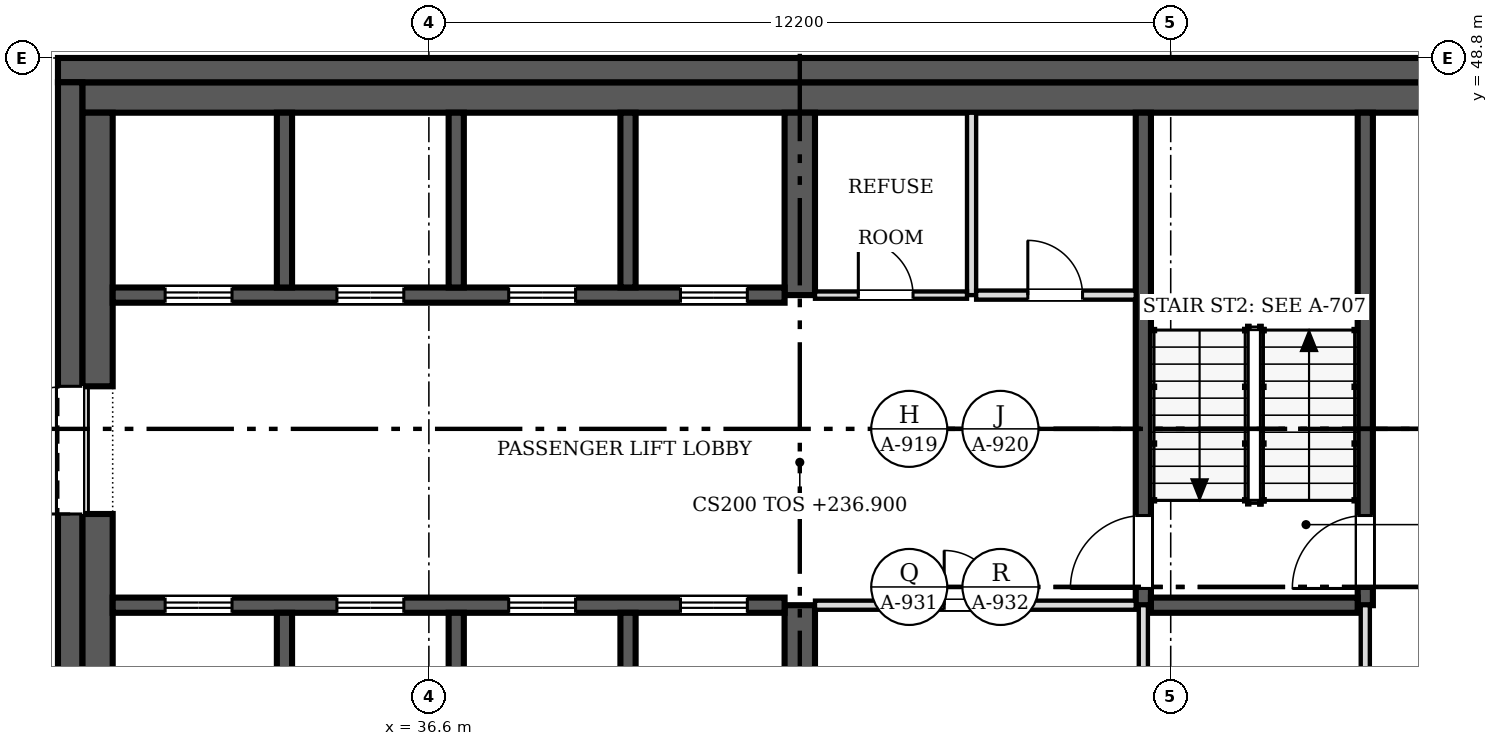
"""IFC4 building model, lengths in metres.
Left out: names, types, materials, properties, quantities, classifications, styles, units other than length and angle.
Written with IfcOpenShell. Run it as: python <this file> out.ifc"""

import sys

from ifc_helpers import new_model, si_unit, direction, frame, frame_2d, origin, place, context, subcontext, project, spatial, rectangle, extrude, source, transform, mapped, element, fill, save


model = new_model("IFC4")
c1 = context("Model", 3, precision=1e-05, world=origin(), true_north=direction((0.0, 1.0)))
c2 = subcontext(c1, "Body", "Model", "MODEL_VIEW")
j1 = project(units=[si_unit("LENGTHUNIT", "METRE"), si_unit("PLANEANGLEUNIT", "RADIAN")], contexts=[c1])
p1 = place(None, origin())
s1 = spatial("IfcSite", under=j1, at=p1, CompositionType="ELEMENT")
p2 = place(p1, origin())
s2 = spatial("IfcBuilding", under=s1, at=p2, CompositionType="ELEMENT")
p3 = place(p2, frame((0.0, 0.0, 236.9)))
s3 = spatial("IfcBuildingStorey", under=s2, at=p3, CompositionType="ELEMENT", Elevation=236.9)
p4 = place(p3, frame((30.7, 24.8, 0.0), z_axis=(0.0, 0.0, 1.0), x_axis=(0.0, 1.0, 0.0)))
e1 = element("IfcWall", 1, at=p4, inside=s3, PredefinedType="SHEAR", context=c2, shape_type="SweptSolid", body=[
    extrude(rectangle(XDim=23.6, YDim=0.4, at=frame_2d((11.8, 0.0))), origin(), (0.0, 0.0, 1.0), 3.8),
])
m1 = source(origin(), c2, "Body", "SweptSolid", [
    extrude(rectangle(XDim=2.1, YDim=2.4, at=frame_2d((1.05, 1.2))), frame((0.0, 0.21, 0.0), z_axis=(0.0, -1.0, 0.0), x_axis=(1.0, 0.0, 0.0)), (0.0, 0.0, 1.0), 0.42),
])
p5 = place(p4, frame((5.0, 0.0, 0.0)))
e2 = element("IfcOpeningElement", 2, at=p5, cuts=e1, PredefinedType="OPENING", context=c2, shape_type="MappedRepresentation", body=[
    mapped(m1, transform((0.0, 0.0, 0.0), scale=1.0)),
])
p6 = place(p4, frame((16.5, 0.0, 0.0)))
e3 = element("IfcOpeningElement", 3, at=p6, cuts=e1, PredefinedType="OPENING", context=c2, shape_type="MappedRepresentation", body=[
    mapped(m1, transform((0.0, 0.0, 0.0), scale=1.0)),
])
p7 = place(p3, frame((30.5, 48.6, 0.0), z_axis=(0.0, 0.0, 1.0), x_axis=(1.0, 0.0, 0.0)))
e4 = element("IfcWall", 4, at=p7, inside=s3, PredefinedType="SHEAR", context=c2, shape_type="SweptSolid", body=[
    extrude(rectangle(XDim=24.4, YDim=0.4, at=frame_2d((12.2, 0.0))), origin(), (0.0, 0.0, 1.0), 3.8),
])
p8 = place(p3, frame((30.9, 48.15, 0.0), z_axis=(0.0, 0.0, 1.0), x_axis=(1.0, 0.0, 0.0)))
e5 = element("IfcWall", 5, at=p8, inside=s3, PredefinedType="SOLIDWALL", context=c2, shape_type="SweptSolid", body=[
    extrude(rectangle(XDim=23.6, YDim=0.5, at=frame_2d((11.8, 0.0))), origin(), (0.0, 0.0, 1.0), 3.8),
])
p9 = place(p3, frame((31.15, 31.9, 0.0), z_axis=(0.0, 0.0, 1.0), x_axis=(0.0, 1.0, 0.0)))
e6 = element("IfcWall", 6, at=p9, inside=s3, PredefinedType="SOLIDWALL", context=c2, shape_type="SweptSolid", body=[
    extrude(rectangle(XDim=9.4, YDim=0.5, at=frame_2d((4.7, 0.0))), origin(), (0.0, 0.0, 1.0), 3.8),
])
p10 = place(p3, frame((31.15, 43.4, 0.0), z_axis=(0.0, 0.0, 1.0), x_axis=(0.0, 1.0, 0.0)))
e7 = element("IfcWall", 7, at=p10, inside=s3, PredefinedType="SOLIDWALL", context=c2, shape_type="SweptSolid", body=[
    extrude(rectangle(XDim=4.5, YDim=0.5, at=frame_2d((2.25, 0.0))), origin(), (0.0, 0.0, 1.0), 3.8),
])
p11 = place(p3, frame((42.7, 36.85, 0.0), z_axis=(0.0, 0.0, 1.0), x_axis=(0.0, 1.0, 0.0)))
e8 = element("IfcWall", 8, at=p11, inside=s3, PredefinedType="SHEAR", context=c2, shape_type="SweptSolid", body=[
    extrude(rectangle(XDim=2.95, YDim=0.5, at=frame_2d((1.475, 0.0))), origin(), (0.0, 0.0, 1.0), 3.8),
])
p12 = place(p3, frame((42.7, 44.9, 0.0), z_axis=(0.0, 0.0, 1.0), x_axis=(0.0, 1.0, 0.0)))
e9 = element("IfcWall", 9, at=p12, inside=s3, PredefinedType="SHEAR", context=c2, shape_type="SweptSolid", body=[
    extrude(rectangle(XDim=3.0, YDim=0.5, at=frame_2d((1.5, 0.0))), origin(), (0.0, 0.0, 1.0), 3.8),
])
p13 = place(p3, frame((31.4, 39.8, 0.0), z_axis=(0.0, 0.0, 1.0), x_axis=(1.0, 0.0, 0.0)))
e10 = element("IfcWall", 10, at=p13, inside=s3, PredefinedType="SOLIDWALL", context=c2, shape_type="SweptSolid", body=[
    extrude(rectangle(XDim=11.05, YDim=0.25, at=frame_2d((5.525, 0.0))), origin(), (0.0, 0.0, 1.0), 3.8),
])
m2 = source(origin(), c2, "Body", "SweptSolid", [
    extrude(rectangle(XDim=1.1, YDim=2.1, at=frame_2d((0.55, 1.05))), frame((0.0, 0.135, 0.0), z_axis=(0.0, -1.0, 0.0), x_axis=(1.0, 0.0, 0.0)), (0.0, 0.0, 1.0), 0.27),
])
p14 = place(p13, frame((0.863, 0.0, 0.0)))
e11 = element("IfcOpeningElement", 11, at=p14, cuts=e10, PredefinedType="OPENING", context=c2, shape_type="MappedRepresentation", body=[
    mapped(m2, transform((0.0, 0.0, 0.0), scale=1.0)),
])
p15 = place(p13, frame((3.688, 0.0, 0.0)))
e12 = element("IfcOpeningElement", 12, at=p15, cuts=e10, PredefinedType="OPENING", context=c2, shape_type="MappedRepresentation", body=[
    mapped(m2, transform((0.0, 0.0, 0.0), scale=1.0)),
])
p16 = place(p13, frame((6.512, 0.0, 0.0)))
e13 = element("IfcOpeningElement", 13, at=p16, cuts=e10, PredefinedType="OPENING", context=c2, shape_type="MappedRepresentation", body=[
    mapped(m2, transform((0.0, 0.0, 0.0), scale=1.0)),
])
p17 = place(p13, frame((9.337, 0.0, 0.0)))
e14 = element("IfcOpeningElement", 14, at=p17, cuts=e10, PredefinedType="OPENING", context=c2, shape_type="MappedRepresentation", body=[
    mapped(m2, transform((0.0, 0.0, 0.0), scale=1.0)),
])
p18 = place(p3, frame((42.45, 44.9, 0.0), z_axis=(0.0, 0.0, 1.0), x_axis=(-1.0, 0.0, 0.0)))
e15 = element("IfcWall", 15, at=p18, inside=s3, PredefinedType="SOLIDWALL", context=c2, shape_type="SweptSolid", body=[
    extrude(rectangle(XDim=11.05, YDim=0.25, at=frame_2d((5.525, 0.0))), origin(), (0.0, 0.0, 1.0), 3.8),
])
p19 = place(p18, frame((9.087, 0.0, 0.0)))
e16 = element("IfcOpeningElement", 16, at=p19, cuts=e15, PredefinedType="OPENING", context=c2, shape_type="MappedRepresentation", body=[
    mapped(m2, transform((0.0, 0.0, 0.0), scale=1.0)),
])
p20 = place(p18, frame((6.262, 0.0, 0.0)))
e17 = element("IfcOpeningElement", 17, at=p20, cuts=e15, PredefinedType="OPENING", context=c2, shape_type="MappedRepresentation", body=[
    mapped(m2, transform((0.0, 0.0, 0.0), scale=1.0)),
])
p21 = place(p18, frame((3.438, 0.0, 0.0)))
e18 = element("IfcOpeningElement", 18, at=p21, cuts=e15, PredefinedType="OPENING", context=c2, shape_type="MappedRepresentation", body=[
    mapped(m2, transform((0.0, 0.0, 0.0), scale=1.0)),
])
p22 = place(p18, frame((0.613, 0.0, 0.0)))
e19 = element("IfcOpeningElement", 19, at=p22, cuts=e15, PredefinedType="OPENING", context=c2, shape_type="MappedRepresentation", body=[
    mapped(m2, transform((0.0, 0.0, 0.0), scale=1.0)),
])
p23 = place(p3, frame((48.35, 47.9, 0.0), z_axis=(0.0, 0.0, 1.0), x_axis=(0.0, -1.0, 0.0)))
e20 = element("IfcWall", 20, at=p23, inside=s3, PredefinedType="SOLIDWALL", context=c2, shape_type="SweptSolid", body=[
    extrude(rectangle(XDim=8.1, YDim=0.25, at=frame_2d((4.05, 0.0))), origin(), (0.0, 0.0, 1.0), 3.8),
])
m3 = source(origin(), c2, "Body", "SweptSolid", [
    extrude(rectangle(XDim=1.2, YDim=2.1, at=frame_2d((0.6, 1.05))), frame((0.0, 0.135, 0.0), z_axis=(0.0, -1.0, 0.0), x_axis=(1.0, 0.0, 0.0)), (0.0, 0.0, 1.0), 0.27),
])
p24 = place(p23, frame((6.625, 0.0, 0.0)))
e21 = element("IfcOpeningElement", 21, at=p24, cuts=e20, PredefinedType="OPENING", context=c2, shape_type="MappedRepresentation", body=[
    mapped(m3, transform((0.0, 0.0, 0.0), scale=1.0)),
])
p25 = place(p3, frame((52.0, 39.8, 0.0), z_axis=(0.0, 0.0, 1.0), x_axis=(0.0, 1.0, 0.0)))
e22 = element("IfcWall", 22, at=p25, inside=s3, PredefinedType="SOLIDWALL", context=c2, shape_type="SweptSolid", body=[
    extrude(rectangle(XDim=8.1, YDim=0.25, at=frame_2d((4.05, 0.0))), origin(), (0.0, 0.0, 1.0), 3.8),
])
p26 = place(p25, frame((0.275, 0.0, 0.0)))
e23 = element("IfcOpeningElement", 23, at=p26, cuts=e22, PredefinedType="OPENING", context=c2, shape_type="MappedRepresentation", body=[
    mapped(m3, transform((0.0, 0.0, 0.0), scale=1.0)),
])
p27 = place(p3, frame((48.475, 39.8, 0.0), z_axis=(0.0, 0.0, 1.0), x_axis=(1.0, 0.0, 0.0)))
e24 = element("IfcWall", 24, at=p27, inside=s3, PredefinedType="SOLIDWALL", context=c2, shape_type="SweptSolid", body=[
    extrude(rectangle(XDim=3.4, YDim=0.25, at=frame_2d((1.7, 0.0))), origin(), (0.0, 0.0, 1.0), 3.8),
])
for number, where, z_axis, x_axis in (
    (25, (34.225, 36.85, 0.0), (0.0, 0.0, 1.0), (0.0, 1.0, 0.0)),
    (26, (37.05, 36.85, 0.0), (0.0, 0.0, 1.0), (0.0, 1.0, 0.0)),
    (27, (39.875, 36.85, 0.0), (0.0, 0.0, 1.0), (0.0, 1.0, 0.0)),
):
    element("IfcWall", number, at=place(p3, frame(where, z_axis=z_axis, x_axis=x_axis)), inside=s3, PredefinedType="SOLIDWALL", context=c2, shape_type="SweptSolid", body=[
        extrude(rectangle(XDim=2.825, YDim=0.25, at=frame_2d((1.413, 0.0))), origin(), (0.0, 0.0, 1.0), 3.8),
    ])
for number, where, z_axis, x_axis in (
    (28, (34.225, 45.025, 0.0), (0.0, 0.0, 1.0), (0.0, 1.0, 0.0)),
    (29, (37.05, 45.025, 0.0), (0.0, 0.0, 1.0), (0.0, 1.0, 0.0)),
    (30, (39.875, 45.025, 0.0), (0.0, 0.0, 1.0), (0.0, 1.0, 0.0)),
):
    element("IfcWall", number, at=place(p3, frame(where, z_axis=z_axis, x_axis=x_axis)), inside=s3, PredefinedType="SOLIDWALL", context=c2, shape_type="SweptSolid", body=[
        extrude(rectangle(XDim=2.875, YDim=0.25, at=frame_2d((1.438, 0.0))), origin(), (0.0, 0.0, 1.0), 3.8),
    ])
p28 = place(p3, frame((52.0, 33.525, 0.0), z_axis=(0.0, 0.0, 1.0), x_axis=(0.0, 1.0, 0.0)))
e31 = element("IfcWall", 31, at=p28, inside=s3, PredefinedType="PARTITIONING", context=c2, shape_type="SweptSolid", body=[
    extrude(rectangle(XDim=6.275, YDim=0.15, at=frame_2d((3.138, 0.0))), origin(), (0.0, 0.0, 1.0), 3.6),
])
m4 = source(origin(), c2, "Body", "SweptSolid", [
    extrude(rectangle(XDim=0.9, YDim=2.1, at=frame_2d((0.45, 1.05))), frame((0.0, 0.085, 0.0), z_axis=(0.0, -1.0, 0.0), x_axis=(1.0, 0.0, 0.0)), (0.0, 0.0, 1.0), 0.17),
])
p29 = place(p28, frame((1.025, 0.0, 0.0)))
e32 = element("IfcOpeningElement", 32, at=p29, cuts=e31, PredefinedType="OPENING", context=c2, shape_type="MappedRepresentation", body=[
    mapped(m4, transform((0.0, 0.0, 0.0), scale=1.0)),
])
p30 = place(p3, frame((48.225, 39.8, 0.0), z_axis=(0.0, 0.0, 1.0), x_axis=(-1.0, 0.0, 0.0)))
e33 = element("IfcWall", 33, at=p30, inside=s3, PredefinedType="PARTITIONING", context=c2, shape_type="SweptSolid", body=[
    extrude(rectangle(XDim=5.275, YDim=0.15, at=frame_2d((2.638, 0.0))), origin(), (0.0, 0.0, 1.0), 3.6),
])
p31 = place(p30, frame((2.25, 0.0, 0.0)))
e34 = element("IfcOpeningElement", 34, at=p31, cuts=e33, PredefinedType="OPENING", context=c2, shape_type="MappedRepresentation", body=[
    mapped(m4, transform((0.0, 0.0, 0.0), scale=1.0)),
])
p32 = place(p3, frame((48.35, 36.85, 0.0), z_axis=(0.0, 0.0, 1.0), x_axis=(0.0, 1.0, 0.0)))
e35 = element("IfcWall", 35, at=p32, inside=s3, PredefinedType="PARTITIONING", context=c2, shape_type="SweptSolid", body=[
    extrude(rectangle(XDim=2.95, YDim=0.15, at=frame_2d((1.475, 0.0))), origin(), (0.0, 0.0, 1.0), 3.6),
])
p33 = place(p3, frame((45.525, 44.9, 0.0), z_axis=(0.0, 0.0, 1.0), x_axis=(0.0, 1.0, 0.0)))
e36 = element("IfcWall", 36, at=p33, inside=s3, PredefinedType="PARTITIONING", context=c2, shape_type="SweptSolid", body=[
    extrude(rectangle(XDim=3.0, YDim=0.15, at=frame_2d((1.5, 0.0))), origin(), (0.0, 0.0, 1.0), 3.6),
])
p34 = place(p3, frame((42.95, 44.9, 0.0), z_axis=(0.0, 0.0, 1.0), x_axis=(1.0, 0.0, 0.0)))
e37 = element("IfcWall", 37, at=p34, inside=s3, PredefinedType="PARTITIONING", context=c2, shape_type="SweptSolid", body=[
    extrude(rectangle(XDim=2.5, YDim=0.12, at=frame_2d((1.25, 0.0))), origin(), (0.0, 0.0, 1.0), 3.6),
])
m5 = source(origin(), c2, "Body", "SweptSolid", [
    extrude(rectangle(XDim=0.9, YDim=2.1, at=frame_2d((0.45, 1.05))), frame((0.0, 0.07, 0.0), z_axis=(0.0, -1.0, 0.0), x_axis=(1.0, 0.0, 0.0)), (0.0, 0.0, 1.0), 0.14),
])
p35 = place(p34, frame((0.712, 0.0, 0.0)))
e38 = element("IfcOpeningElement", 38, at=p35, cuts=e37, PredefinedType="OPENING", context=c2, shape_type="MappedRepresentation", body=[
    mapped(m5, transform((0.0, 0.0, 0.0), scale=1.0)),
])
p36 = place(p3, frame((45.6, 44.9, 0.0), z_axis=(0.0, 0.0, 1.0), x_axis=(1.0, 0.0, 0.0)))
e39 = element("IfcWall", 39, at=p36, inside=s3, PredefinedType="PARTITIONING", context=c2, shape_type="SweptSolid", body=[
    extrude(rectangle(XDim=2.625, YDim=0.15, at=frame_2d((1.312, 0.0))), origin(), (0.0, 0.0, 1.0), 3.6),
])
p37 = place(p36, frame((0.85, 0.0, 0.0)))
e40 = element("IfcOpeningElement", 40, at=p37, cuts=e39, PredefinedType="OPENING", context=c2, shape_type="MappedRepresentation", body=[
    mapped(m4, transform((0.0, 0.0, 0.0), scale=1.0)),
])
m6 = source(origin(), c2, "Body", "SweptSolid", [
    extrude(rectangle(XDim=2.1, YDim=2.4, at=frame_2d((1.05, 1.2))), frame((0.0, 0.025, 0.0), z_axis=(0.0, -1.0, 0.0), x_axis=(1.0, 0.0, 0.0)), (0.0, 0.0, 1.0), 0.05),
])
p38 = place(p6, origin())
e41 = element("IfcDoor", 41, at=p38, inside=s3, OperationType="DOUBLE_DOOR_SINGLE_SWING", PredefinedType="DOOR", context=c2, shape_type="MappedRepresentation", body=[
    mapped(m6, transform((0.0, 0.0, 0.0), scale=1.0)),
])
fill(e3, e41)
m7 = source(origin(), c2, "Body", "SweptSolid", [
    extrude(rectangle(XDim=1.1, YDim=2.1, at=frame_2d((0.55, 1.05))), frame((0.0, 0.025, 0.0), z_axis=(0.0, -1.0, 0.0), x_axis=(1.0, 0.0, 0.0)), (0.0, 0.0, 1.0), 0.05),
])
p39 = place(p14, origin())
e42 = element("IfcDoor", 42, at=p39, inside=s3, OperationType="DOUBLE_DOOR_SLIDING", PredefinedType="DOOR", context=c2, shape_type="MappedRepresentation", body=[
    mapped(m7, transform((0.0, 0.0, 0.0), scale=1.0)),
])
fill(e11, e42)
p40 = place(p15, origin())
e43 = element("IfcDoor", 43, at=p40, inside=s3, OperationType="DOUBLE_DOOR_SLIDING", PredefinedType="DOOR", context=c2, shape_type="MappedRepresentation", body=[
    mapped(m7, transform((0.0, 0.0, 0.0), scale=1.0)),
])
fill(e12, e43)
p41 = place(p16, origin())
e44 = element("IfcDoor", 44, at=p41, inside=s3, OperationType="DOUBLE_DOOR_SLIDING", PredefinedType="DOOR", context=c2, shape_type="MappedRepresentation", body=[
    mapped(m7, transform((0.0, 0.0, 0.0), scale=1.0)),
])
fill(e13, e44)
p42 = place(p17, origin())
e45 = element("IfcDoor", 45, at=p42, inside=s3, OperationType="DOUBLE_DOOR_SLIDING", PredefinedType="DOOR", context=c2, shape_type="MappedRepresentation", body=[
    mapped(m7, transform((0.0, 0.0, 0.0), scale=1.0)),
])
fill(e14, e45)
p43 = place(p19, origin())
e46 = element("IfcDoor", 46, at=p43, inside=s3, OperationType="DOUBLE_DOOR_SLIDING", PredefinedType="DOOR", context=c2, shape_type="MappedRepresentation", body=[
    mapped(m7, transform((0.0, 0.0, 0.0), scale=1.0)),
])
fill(e16, e46)
p44 = place(p20, origin())
e47 = element("IfcDoor", 47, at=p44, inside=s3, OperationType="DOUBLE_DOOR_SLIDING", PredefinedType="DOOR", context=c2, shape_type="MappedRepresentation", body=[
    mapped(m7, transform((0.0, 0.0, 0.0), scale=1.0)),
])
fill(e17, e47)
p45 = place(p21, origin())
e48 = element("IfcDoor", 48, at=p45, inside=s3, OperationType="DOUBLE_DOOR_SLIDING", PredefinedType="DOOR", context=c2, shape_type="MappedRepresentation", body=[
    mapped(m7, transform((0.0, 0.0, 0.0), scale=1.0)),
])
fill(e18, e48)
p46 = place(p22, origin())
e49 = element("IfcDoor", 49, at=p46, inside=s3, OperationType="DOUBLE_DOOR_SLIDING", PredefinedType="DOOR", context=c2, shape_type="MappedRepresentation", body=[
    mapped(m7, transform((0.0, 0.0, 0.0), scale=1.0)),
])
fill(e19, e49)
m8 = source(origin(), c2, "Body", "SweptSolid", [
    extrude(rectangle(XDim=1.2, YDim=2.1, at=frame_2d((0.6, 1.05))), frame((0.0, 0.025, 0.0), z_axis=(0.0, -1.0, 0.0), x_axis=(1.0, 0.0, 0.0)), (0.0, 0.0, 1.0), 0.05),
])
p47 = place(p24, origin())
e50 = element("IfcDoor", 50, at=p47, inside=s3, OperationType="SINGLE_SWING_RIGHT", PredefinedType="DOOR", context=c2, shape_type="MappedRepresentation", body=[
    mapped(m8, transform((0.0, 0.0, 0.0), scale=1.0)),
])
fill(e21, e50)
p48 = place(p26, origin())
e51 = element("IfcDoor", 51, at=p48, inside=s3, OperationType="SINGLE_SWING_LEFT", PredefinedType="DOOR", context=c2, shape_type="MappedRepresentation", body=[
    mapped(m8, transform((0.0, 0.0, 0.0), scale=1.0)),
])
fill(e23, e51)
m9 = source(origin(), c2, "Body", "SweptSolid", [
    extrude(rectangle(XDim=0.9, YDim=2.1, at=frame_2d((0.45, 1.05))), frame((0.0, 0.025, 0.0), z_axis=(0.0, -1.0, 0.0), x_axis=(1.0, 0.0, 0.0)), (0.0, 0.0, 1.0), 0.05),
])
p49 = place(p31, origin())
e52 = element("IfcDoor", 52, at=p49, inside=s3, OperationType="SINGLE_SWING_RIGHT", PredefinedType="DOOR", context=c2, shape_type="MappedRepresentation", body=[
    mapped(m9, transform((0.0, 0.0, 0.0), scale=1.0)),
])
fill(e34, e52)
p50 = place(p35, origin())
e53 = element("IfcDoor", 53, at=p50, inside=s3, OperationType="SINGLE_SWING_LEFT", PredefinedType="DOOR", context=c2, shape_type="MappedRepresentation", body=[
    mapped(m9, transform((0.0, 0.0, 0.0), scale=1.0)),
])
fill(e38, e53)
p51 = place(p37, origin())
e54 = element("IfcDoor", 54, at=p51, inside=s3, OperationType="SINGLE_SWING_LEFT", PredefinedType="DOOR", context=c2, shape_type="MappedRepresentation", body=[
    mapped(m9, transform((0.0, 0.0, 0.0), scale=1.0)),
])
fill(e40, e54)
save(model, sys.argv[1])
